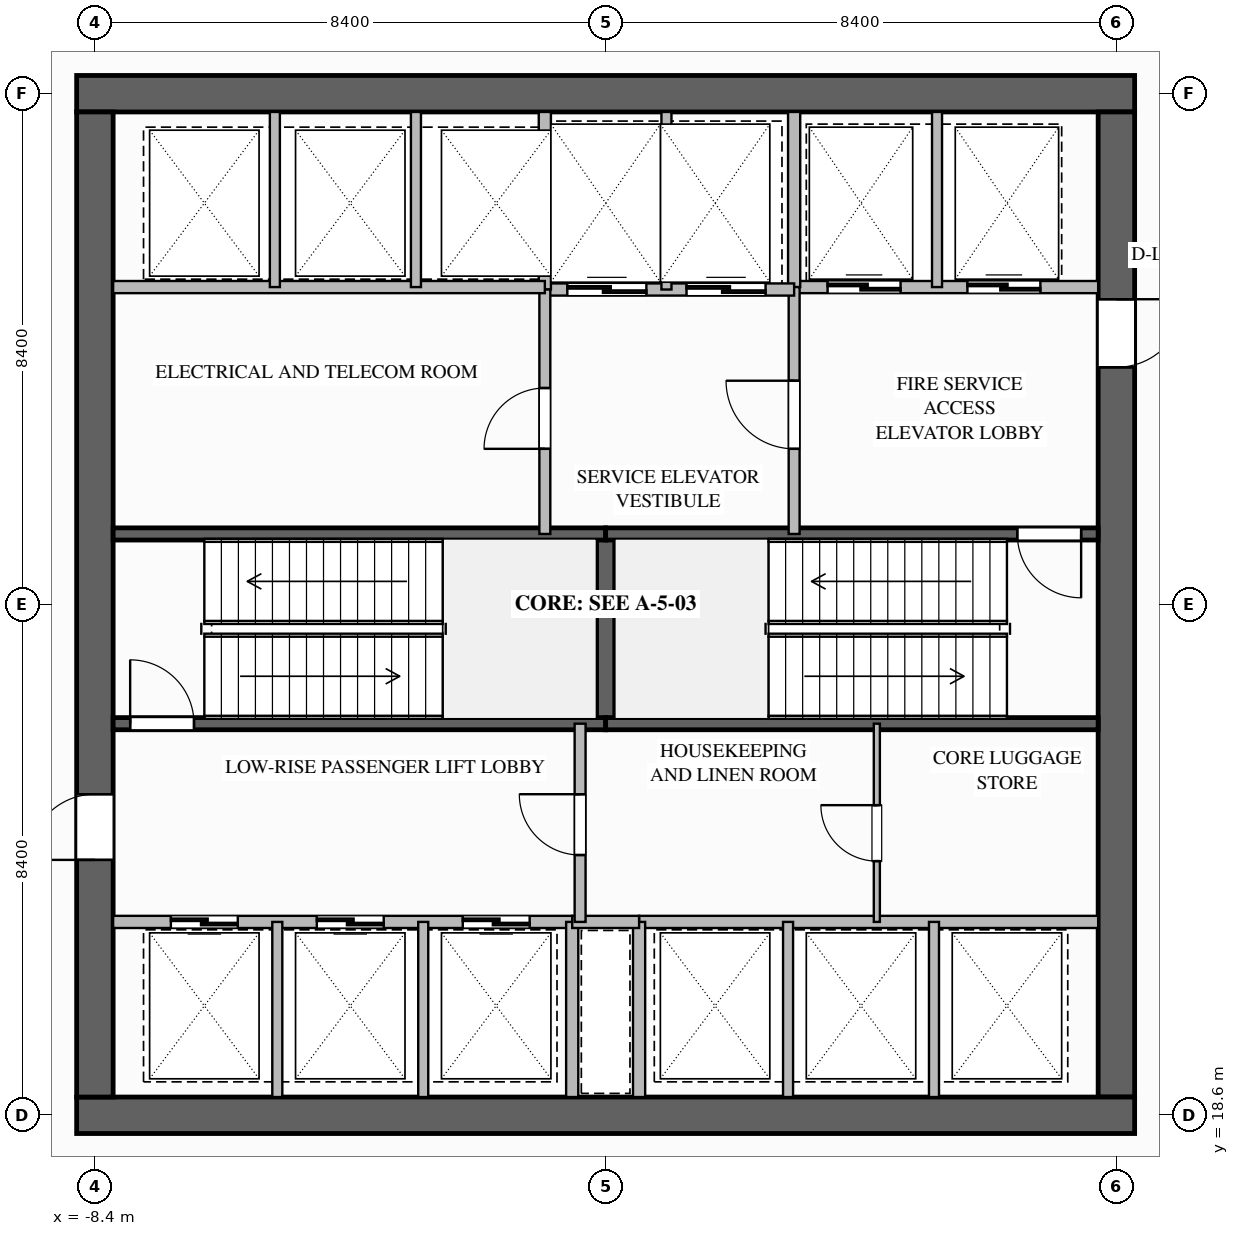
"""IFC4 building model, lengths in metres.
Left out: names, types, materials, properties, quantities, classifications, styles, units other than length and angle.
Written with IfcOpenShell. Run it as: python <this file> out.ifc"""

import sys

from ifc_helpers import new_model, si_unit, direction, frame, frame_2d, origin, place, context, subcontext, project, spatial, rectangle, extrude, element, fill, save


model = new_model("IFC4")
c1 = context("Model", 3, precision=1e-05, world=origin(), true_north=direction((0.0, 1.0)))
c2 = subcontext(c1, "Body", "Model", "MODEL_VIEW")
j1 = project(units=[si_unit("LENGTHUNIT", "METRE"), si_unit("PLANEANGLEUNIT", "RADIAN")], contexts=[c1])
p1 = place(None, origin())
s1 = spatial("IfcSite", under=j1, at=p1, CompositionType="ELEMENT")
p2 = place(p1, origin())
s2 = spatial("IfcBuilding", under=s1, at=p2, CompositionType="ELEMENT")
p3 = place(p2, frame((0.0, 0.0, 22.4)))
s3 = spatial("IfcBuildingStorey", under=s2, at=p3, CompositionType="ELEMENT", Elevation=22.4)
p4 = place(p3, frame((-8.7, 35.4, 0.0), z_axis=(0.0, 0.0, 1.0), x_axis=(1.0, 0.0, 0.0)))
e1 = element("IfcWall", 1, at=p4, inside=s3, PredefinedType="SHEAR", context=c2, shape_type="SweptSolid", body=[
    extrude(rectangle(XDim=17.4, YDim=0.6, at=frame_2d((8.7, 0.0))), origin(), (0.0, 0.0, 1.0), 5.2),
])
p5 = place(p3, frame((8.4, 35.1, 0.0), z_axis=(0.0, 0.0, 1.0), x_axis=(0.0, -1.0, 0.0)))
e2 = element("IfcWall", 2, at=p5, inside=s3, PredefinedType="SHEAR", context=c2, shape_type="SweptSolid", body=[
    extrude(rectangle(XDim=16.2, YDim=0.6, at=frame_2d((8.1, 0.0))), origin(), (0.0, 0.0, 1.0), 5.2),
])
p6 = place(p5, frame((3.08, 0.0, 0.0)))
e3 = element("IfcOpeningElement", 3, at=p6, cuts=e2, PredefinedType="OPENING", context=c2, shape_type="SweptSolid", body=[
    extrude(rectangle(XDim=1.12, YDim=2.1, at=frame_2d((0.56, 1.05))), frame((0.0, 0.31, 0.0), z_axis=(0.0, -1.0, 0.0), x_axis=(1.0, 0.0, 0.0)), (0.0, 0.0, 1.0), 0.62),
])
p7 = place(p3, frame((8.7, 18.6, 0.0), z_axis=(0.0, 0.0, 1.0), x_axis=(-1.0, 0.0, 0.0)))
e4 = element("IfcWall", 4, at=p7, inside=s3, PredefinedType="SHEAR", context=c2, shape_type="SweptSolid", body=[
    extrude(rectangle(XDim=17.4, YDim=0.6, at=frame_2d((8.7, 0.0))), origin(), (0.0, 0.0, 1.0), 5.2),
])
p8 = place(p3, frame((-8.4, 18.9, 0.0), z_axis=(0.0, 0.0, 1.0), x_axis=(0.0, 1.0, 0.0)))
e5 = element("IfcWall", 5, at=p8, inside=s3, PredefinedType="SHEAR", context=c2, shape_type="SweptSolid", body=[
    extrude(rectangle(XDim=16.2, YDim=0.6, at=frame_2d((8.1, 0.0))), origin(), (0.0, 0.0, 1.0), 5.2),
])
p9 = place(p8, frame((3.9, 0.0, 0.0)))
e6 = element("IfcOpeningElement", 6, at=p9, cuts=e5, PredefinedType="OPENING", context=c2, shape_type="SweptSolid", body=[
    extrude(rectangle(XDim=1.08, YDim=2.04, at=frame_2d((0.54, 1.02))), frame((0.0, 0.31, 0.0), z_axis=(0.0, -1.0, 0.0), x_axis=(1.0, 0.0, 0.0)), (0.0, 0.0, 1.0), 0.62),
])
p10 = place(p3, frame((0.0, 25.04, 0.0), z_axis=(0.0, 0.0, 1.0), x_axis=(0.0, 1.0, 0.0)))
e7 = element("IfcWall", 7, at=p10, inside=s3, PredefinedType="SOLIDWALL", context=c2, shape_type="SweptSolid", body=[
    extrude(rectangle(XDim=3.12, YDim=0.3, at=frame_2d((1.56, 0.0))), origin(), (0.0, 0.0, 1.0), 4.85),
])
p11 = place(p3, frame((-8.1, 25.04, 0.0), z_axis=(0.0, 0.0, 1.0), x_axis=(1.0, 0.0, 0.0)))
e8 = element("IfcWall", 8, at=p11, inside=s3, PredefinedType="SOLIDWALL", context=c2, shape_type="SweptSolid", body=[
    extrude(rectangle(XDim=8.1, YDim=0.2, at=frame_2d((4.05, 0.0))), origin(), (0.0, 0.0, 1.0), 4.85),
])
p12 = place(p11, frame((0.28, 0.0, 0.0)))
e9 = element("IfcOpeningElement", 9, at=p12, cuts=e8, PredefinedType="OPENING", context=c2, shape_type="SweptSolid", body=[
    extrude(rectangle(XDim=1.05, YDim=2.1, at=frame_2d((0.525, 1.05))), frame((0.0, 0.11, 0.0), z_axis=(0.0, -1.0, 0.0), x_axis=(1.0, 0.0, 0.0)), (0.0, 0.0, 1.0), 0.22),
])
for number, where, z_axis, x_axis in (
    (10, (-8.1, 28.16, 0.0), (0.0, 0.0, 1.0), (1.0, 0.0, 0.0)),
    (11, (0.0, 25.04, 0.0), (0.0, 0.0, 1.0), (1.0, 0.0, 0.0)),
):
    element("IfcWall", number, at=place(p3, frame(where, z_axis=z_axis, x_axis=x_axis)), inside=s3, PredefinedType="SOLIDWALL", context=c2, shape_type="SweptSolid", body=[
        extrude(rectangle(XDim=8.1, YDim=0.2, at=frame_2d((4.05, 0.0))), origin(), (0.0, 0.0, 1.0), 4.85),
    ])
p13 = place(p3, frame((8.1, 28.16, 0.0), z_axis=(0.0, 0.0, 1.0), x_axis=(-1.0, 0.0, 0.0)))
e12 = element("IfcWall", 12, at=p13, inside=s3, PredefinedType="SOLIDWALL", context=c2, shape_type="SweptSolid", body=[
    extrude(rectangle(XDim=8.1, YDim=0.2, at=frame_2d((4.05, 0.0))), origin(), (0.0, 0.0, 1.0), 4.85),
])
p14 = place(p13, frame((0.28, 0.0, 0.0)))
e13 = element("IfcOpeningElement", 13, at=p14, cuts=e12, PredefinedType="OPENING", context=c2, shape_type="SweptSolid", body=[
    extrude(rectangle(XDim=1.05, YDim=2.1, at=frame_2d((0.525, 1.05))), frame((0.0, 0.11, 0.0), z_axis=(0.0, -1.0, 0.0), x_axis=(1.0, 0.0, 0.0)), (0.0, 0.0, 1.0), 0.22),
])
p15 = place(p3, frame((3.1, 32.22, 0.0), z_axis=(0.0, 0.0, 1.0), x_axis=(1.0, 0.0, 0.0)))
e14 = element("IfcWall", 14, at=p15, inside=s3, PredefinedType="SOLIDWALL", context=c2, shape_type="SweptSolid", body=[
    extrude(rectangle(XDim=5.0, YDim=0.2, at=frame_2d((2.5, 0.0))), origin(), (0.0, 0.0, 1.0), 4.85),
])
p16 = place(p15, frame((0.55, 0.0, 0.0)))
e15 = element("IfcOpeningElement", 15, at=p16, cuts=e14, PredefinedType="OPENING", context=c2, shape_type="SweptSolid", body=[
    extrude(rectangle(XDim=1.2, YDim=2.2, at=frame_2d((0.6, 1.1))), frame((0.0, 0.11, 0.0), z_axis=(0.0, -1.0, 0.0), x_axis=(1.0, 0.0, 0.0)), (0.0, 0.0, 1.0), 0.22),
])
p17 = place(p15, frame((2.85, 0.0, 0.0)))
e16 = element("IfcOpeningElement", 16, at=p17, cuts=e14, PredefinedType="OPENING", context=c2, shape_type="SweptSolid", body=[
    extrude(rectangle(XDim=1.2, YDim=2.2, at=frame_2d((0.6, 1.1))), frame((0.0, 0.11, 0.0), z_axis=(0.0, -1.0, 0.0), x_axis=(1.0, 0.0, 0.0)), (0.0, 0.0, 1.0), 0.22),
])
p18 = place(p3, frame((3.1, 32.22, 0.0), z_axis=(0.0, 0.0, 1.0), x_axis=(0.0, 1.0, 0.0)))
e17 = element("IfcWall", 17, at=p18, inside=s3, PredefinedType="SOLIDWALL", context=c2, shape_type="SweptSolid", body=[
    extrude(rectangle(XDim=2.88, YDim=0.2, at=frame_2d((1.44, 0.0))), origin(), (0.0, 0.0, 1.0), 4.85),
])
p19 = place(p3, frame((5.45, 32.22, 0.0), z_axis=(0.0, 0.0, 1.0), x_axis=(0.0, 1.0, 0.0)))
e18 = element("IfcWall", 18, at=p19, inside=s3, PredefinedType="PARTITIONING", context=c2, shape_type="SweptSolid", body=[
    extrude(rectangle(XDim=2.88, YDim=0.165, at=frame_2d((1.44, 0.0))), origin(), (0.0, 0.0, 1.0), 4.85),
])
p20 = place(p3, frame((3.1, 28.16, 0.0), z_axis=(0.0, 0.0, 1.0), x_axis=(0.0, 1.0, 0.0)))
e19 = element("IfcWall", 19, at=p20, inside=s3, PredefinedType="SOLIDWALL", context=c2, shape_type="SweptSolid", body=[
    extrude(rectangle(XDim=4.06, YDim=0.18, at=frame_2d((2.03, 0.0))), origin(), (0.0, 0.0, 1.0), 4.85),
])
p21 = place(p20, frame((1.4, 0.0, 0.0)))
e20 = element("IfcOpeningElement", 20, at=p21, cuts=e19, PredefinedType="OPENING", context=c2, shape_type="SweptSolid", body=[
    extrude(rectangle(XDim=1.12, YDim=2.1, at=frame_2d((0.56, 1.05))), frame((0.0, 0.1, 0.0), z_axis=(0.0, -1.0, 0.0), x_axis=(1.0, 0.0, 0.0)), (0.0, 0.0, 1.0), 0.2),
])
p22 = place(p3, frame((-1.0, 32.18, 0.0), z_axis=(0.0, 0.0, 1.0), x_axis=(1.0, 0.0, 0.0)))
e21 = element("IfcWall", 21, at=p22, inside=s3, PredefinedType="SOLIDWALL", context=c2, shape_type="SweptSolid", body=[
    extrude(rectangle(XDim=4.1, YDim=0.2, at=frame_2d((2.05, 0.0))), origin(), (0.0, 0.0, 1.0), 4.85),
])
p23 = place(p22, frame((0.37, 0.0, 0.0)))
e22 = element("IfcOpeningElement", 22, at=p23, cuts=e21, PredefinedType="OPENING", context=c2, shape_type="SweptSolid", body=[
    extrude(rectangle(XDim=1.3, YDim=2.2, at=frame_2d((0.65, 1.1))), frame((0.0, 0.11, 0.0), z_axis=(0.0, -1.0, 0.0), x_axis=(1.0, 0.0, 0.0)), (0.0, 0.0, 1.0), 0.22),
])
p24 = place(p22, frame((2.33, 0.0, 0.0)))
e23 = element("IfcOpeningElement", 23, at=p24, cuts=e21, PredefinedType="OPENING", context=c2, shape_type="SweptSolid", body=[
    extrude(rectangle(XDim=1.3, YDim=2.2, at=frame_2d((0.65, 1.1))), frame((0.0, 0.11, 0.0), z_axis=(0.0, -1.0, 0.0), x_axis=(1.0, 0.0, 0.0)), (0.0, 0.0, 1.0), 0.22),
])
p25 = place(p3, frame((-1.0, 32.18, 0.0), z_axis=(0.0, 0.0, 1.0), x_axis=(0.0, 1.0, 0.0)))
e24 = element("IfcWall", 24, at=p25, inside=s3, PredefinedType="SOLIDWALL", context=c2, shape_type="SweptSolid", body=[
    extrude(rectangle(XDim=2.92, YDim=0.2, at=frame_2d((1.46, 0.0))), origin(), (0.0, 0.0, 1.0), 4.85),
])
p26 = place(p3, frame((1.0, 32.18, 0.0), z_axis=(0.0, 0.0, 1.0), x_axis=(0.0, 1.0, 0.0)))
e25 = element("IfcWall", 25, at=p26, inside=s3, PredefinedType="PARTITIONING", context=c2, shape_type="SweptSolid", body=[
    extrude(rectangle(XDim=2.92, YDim=0.165, at=frame_2d((1.46, 0.0))), origin(), (0.0, 0.0, 1.0), 4.85),
])
p27 = place(p3, frame((-1.0, 28.16, 0.0), z_axis=(0.0, 0.0, 1.0), x_axis=(0.0, 1.0, 0.0)))
e26 = element("IfcWall", 26, at=p27, inside=s3, PredefinedType="SOLIDWALL", context=c2, shape_type="SweptSolid", body=[
    extrude(rectangle(XDim=4.02, YDim=0.18, at=frame_2d((2.01, 0.0))), origin(), (0.0, 0.0, 1.0), 4.85),
])
p28 = place(p27, frame((1.4, 0.0, 0.0)))
e27 = element("IfcOpeningElement", 27, at=p28, cuts=e26, PredefinedType="OPENING", context=c2, shape_type="SweptSolid", body=[
    extrude(rectangle(XDim=1.0, YDim=2.1, at=frame_2d((0.5, 1.05))), frame((0.0, 0.1, 0.0), z_axis=(0.0, -1.0, 0.0), x_axis=(1.0, 0.0, 0.0)), (0.0, 0.0, 1.0), 0.2),
])
p29 = place(p3, frame((-8.1, 32.22, 0.0), z_axis=(0.0, 0.0, 1.0), x_axis=(1.0, 0.0, 0.0)))
e28 = element("IfcWall", 28, at=p29, inside=s3, PredefinedType="SOLIDWALL", context=c2, shape_type="SweptSolid", body=[
    extrude(rectangle(XDim=7.1, YDim=0.2, at=frame_2d((3.55, 0.0))), origin(), (0.0, 0.0, 1.0), 4.85),
])
for number, where, z_axis, x_axis in (
    (29, (-5.44, 32.22, 0.0), (0.0, 0.0, 1.0), (0.0, 1.0, 0.0)),
    (30, (-3.12, 32.22, 0.0), (0.0, 0.0, 1.0), (0.0, 1.0, 0.0)),
):
    element("IfcWall", number, at=place(p3, frame(where, z_axis=z_axis, x_axis=x_axis)), inside=s3, PredefinedType="PARTITIONING", context=c2, shape_type="SweptSolid", body=[
        extrude(rectangle(XDim=2.88, YDim=0.165, at=frame_2d((1.44, 0.0))), origin(), (0.0, 0.0, 1.0), 4.85),
    ])
p30 = place(p3, frame((-0.55, 21.78, 0.0), z_axis=(0.0, 0.0, 1.0), x_axis=(-1.0, 0.0, 0.0)))
e31 = element("IfcWall", 31, at=p30, inside=s3, PredefinedType="SOLIDWALL", context=c2, shape_type="SweptSolid", body=[
    extrude(rectangle(XDim=7.55, YDim=0.2, at=frame_2d((3.775, 0.0))), origin(), (0.0, 0.0, 1.0), 4.85),
])
p31 = place(p30, frame((5.5, 0.0, 0.0)))
e32 = element("IfcOpeningElement", 32, at=p31, cuts=e31, PredefinedType="OPENING", context=c2, shape_type="SweptSolid", body=[
    extrude(rectangle(XDim=1.1, YDim=2.2, at=frame_2d((0.55, 1.1))), frame((0.0, 0.11, 0.0), z_axis=(0.0, -1.0, 0.0), x_axis=(1.0, 0.0, 0.0)), (0.0, 0.0, 1.0), 0.22),
])
p32 = place(p30, frame((3.1, 0.0, 0.0)))
e33 = element("IfcOpeningElement", 33, at=p32, cuts=e31, PredefinedType="OPENING", context=c2, shape_type="SweptSolid", body=[
    extrude(rectangle(XDim=1.1, YDim=2.2, at=frame_2d((0.55, 1.1))), frame((0.0, 0.11, 0.0), z_axis=(0.0, -1.0, 0.0), x_axis=(1.0, 0.0, 0.0)), (0.0, 0.0, 1.0), 0.22),
])
p33 = place(p30, frame((0.7, 0.0, 0.0)))
e34 = element("IfcOpeningElement", 34, at=p33, cuts=e31, PredefinedType="OPENING", context=c2, shape_type="SweptSolid", body=[
    extrude(rectangle(XDim=1.1, YDim=2.2, at=frame_2d((0.55, 1.1))), frame((0.0, 0.11, 0.0), z_axis=(0.0, -1.0, 0.0), x_axis=(1.0, 0.0, 0.0)), (0.0, 0.0, 1.0), 0.22),
])
for number, where, z_axis, x_axis in (
    (35, (-5.4, 18.9, 0.0), (0.0, 0.0, 1.0), (0.0, 1.0, 0.0)),
    (36, (-3.0, 18.9, 0.0), (0.0, 0.0, 1.0), (0.0, 1.0, 0.0)),
):
    element("IfcWall", number, at=place(p3, frame(where, z_axis=z_axis, x_axis=x_axis)), inside=s3, PredefinedType="PARTITIONING", context=c2, shape_type="SweptSolid", body=[
        extrude(rectangle(XDim=2.88, YDim=0.165, at=frame_2d((1.44, 0.0))), origin(), (0.0, 0.0, 1.0), 4.85),
    ])
p34 = place(p3, frame((-0.55, 18.9, 0.0), z_axis=(0.0, 0.0, 1.0), x_axis=(0.0, 1.0, 0.0)))
e37 = element("IfcWall", 37, at=p34, inside=s3, PredefinedType="SOLIDWALL", context=c2, shape_type="SweptSolid", body=[
    extrude(rectangle(XDim=2.88, YDim=0.2, at=frame_2d((1.44, 0.0))), origin(), (0.0, 0.0, 1.0), 4.85),
])
p35 = place(p3, frame((8.1, 21.78, 0.0), z_axis=(0.0, 0.0, 1.0), x_axis=(-1.0, 0.0, 0.0)))
e38 = element("IfcWall", 38, at=p35, inside=s3, PredefinedType="SOLIDWALL", context=c2, shape_type="SweptSolid", body=[
    extrude(rectangle(XDim=7.55, YDim=0.2, at=frame_2d((3.775, 0.0))), origin(), (0.0, 0.0, 1.0), 4.85),
])
p36 = place(p3, frame((0.55, 18.9, 0.0), z_axis=(0.0, 0.0, 1.0), x_axis=(0.0, 1.0, 0.0)))
e39 = element("IfcWall", 39, at=p36, inside=s3, PredefinedType="SOLIDWALL", context=c2, shape_type="SweptSolid", body=[
    extrude(rectangle(XDim=2.88, YDim=0.2, at=frame_2d((1.44, 0.0))), origin(), (0.0, 0.0, 1.0), 4.85),
])
for number, where, z_axis, x_axis in (
    (40, (3.0, 18.9, 0.0), (0.0, 0.0, 1.0), (0.0, 1.0, 0.0)),
    (41, (5.4, 18.9, 0.0), (0.0, 0.0, 1.0), (0.0, 1.0, 0.0)),
):
    element("IfcWall", number, at=place(p3, frame(where, z_axis=z_axis, x_axis=x_axis)), inside=s3, PredefinedType="PARTITIONING", context=c2, shape_type="SweptSolid", body=[
        extrude(rectangle(XDim=2.88, YDim=0.165, at=frame_2d((1.44, 0.0))), origin(), (0.0, 0.0, 1.0), 4.85),
    ])
p37 = place(p3, frame((-0.55, 21.78, 0.0), z_axis=(0.0, 0.0, 1.0), x_axis=(1.0, 0.0, 0.0)))
e42 = element("IfcWall", 42, at=p37, inside=s3, PredefinedType="SOLIDWALL", context=c2, shape_type="SweptSolid", body=[
    extrude(rectangle(XDim=1.1, YDim=0.2, at=frame_2d((0.55, 0.0))), origin(), (0.0, 0.0, 1.0), 4.85),
])
p38 = place(p3, frame((-0.42, 21.78, 0.0), z_axis=(0.0, 0.0, 1.0), x_axis=(0.0, 1.0, 0.0)))
e43 = element("IfcWall", 43, at=p38, inside=s3, PredefinedType="SOLIDWALL", context=c2, shape_type="SweptSolid", body=[
    extrude(rectangle(XDim=3.26, YDim=0.18, at=frame_2d((1.63, 0.0))), origin(), (0.0, 0.0, 1.0), 4.85),
])
p39 = place(p38, frame((1.1, 0.0, 0.0)))
e44 = element("IfcOpeningElement", 44, at=p39, cuts=e43, PredefinedType="OPENING", context=c2, shape_type="SweptSolid", body=[
    extrude(rectangle(XDim=1.0, YDim=2.1, at=frame_2d((0.5, 1.05))), frame((0.0, 0.1, 0.0), z_axis=(0.0, -1.0, 0.0), x_axis=(1.0, 0.0, 0.0)), (0.0, 0.0, 1.0), 0.2),
])
p40 = place(p3, frame((4.46, 21.78, 0.0), z_axis=(0.0, 0.0, 1.0), x_axis=(0.0, 1.0, 0.0)))
e45 = element("IfcWall", 45, at=p40, inside=s3, PredefinedType="PARTITIONING", context=c2, shape_type="SweptSolid", body=[
    extrude(rectangle(XDim=3.26, YDim=0.1, at=frame_2d((1.63, 0.0))), origin(), (0.0, 0.0, 1.0), 4.85),
])
p41 = place(p40, frame((1.0, 0.0, 0.0)))
e46 = element("IfcOpeningElement", 46, at=p41, cuts=e45, PredefinedType="OPENING", context=c2, shape_type="SweptSolid", body=[
    extrude(rectangle(XDim=0.92, YDim=2.1, at=frame_2d((0.46, 1.05))), frame((0.0, 0.06, 0.0), z_axis=(0.0, -1.0, 0.0), x_axis=(1.0, 0.0, 0.0)), (0.0, 0.0, 1.0), 0.12),
])
p42 = place(p12, origin())
e47 = element("IfcDoor", 47, at=p42, inside=s3, OperationType="SINGLE_SWING_LEFT", PredefinedType="DOOR", context=c2, shape_type="SweptSolid", body=[
    extrude(rectangle(XDim=1.05, YDim=2.1, at=frame_2d((0.525, 1.05))), frame((0.0, 0.025, 0.0), z_axis=(0.0, -1.0, 0.0), x_axis=(1.0, 0.0, 0.0)), (0.0, 0.0, 1.0), 0.05),
])
fill(e9, e47)
p43 = place(p14, origin())
e48 = element("IfcDoor", 48, at=p43, inside=s3, OperationType="SINGLE_SWING_LEFT", PredefinedType="DOOR", context=c2, shape_type="SweptSolid", body=[
    extrude(rectangle(XDim=1.05, YDim=2.1, at=frame_2d((0.525, 1.05))), frame((0.0, 0.025, 0.0), z_axis=(0.0, -1.0, 0.0), x_axis=(1.0, 0.0, 0.0)), (0.0, 0.0, 1.0), 0.05),
])
fill(e13, e48)
p44 = place(p16, origin())
e49 = element("IfcDoor", 49, at=p44, inside=s3, OperationType="SLIDING_TO_LEFT", PredefinedType="DOOR", context=c2, shape_type="SweptSolid", body=[
    extrude(rectangle(XDim=1.2, YDim=2.2, at=frame_2d((0.6, 1.1))), frame((0.0, 0.025, 0.0), z_axis=(0.0, -1.0, 0.0), x_axis=(1.0, 0.0, 0.0)), (0.0, 0.0, 1.0), 0.05),
])
fill(e15, e49)
p45 = place(p17, origin())
e50 = element("IfcDoor", 50, at=p45, inside=s3, OperationType="SLIDING_TO_LEFT", PredefinedType="DOOR", context=c2, shape_type="SweptSolid", body=[
    extrude(rectangle(XDim=1.2, YDim=2.2, at=frame_2d((0.6, 1.1))), frame((0.0, 0.025, 0.0), z_axis=(0.0, -1.0, 0.0), x_axis=(1.0, 0.0, 0.0)), (0.0, 0.0, 1.0), 0.05),
])
fill(e16, e50)
p46 = place(p21, origin())
e51 = element("IfcDoor", 51, at=p46, inside=s3, OperationType="SINGLE_SWING_RIGHT", PredefinedType="DOOR", context=c2, shape_type="SweptSolid", body=[
    extrude(rectangle(XDim=1.12, YDim=2.1, at=frame_2d((0.56, 1.05))), frame((0.0, 0.025, 0.0), z_axis=(0.0, -1.0, 0.0), x_axis=(1.0, 0.0, 0.0)), (0.0, 0.0, 1.0), 0.05),
])
fill(e20, e51)
p47 = place(p6, origin())
e52 = element("IfcDoor", 52, at=p47, inside=s3, OperationType="SINGLE_SWING_LEFT", PredefinedType="DOOR", context=c2, shape_type="SweptSolid", body=[
    extrude(rectangle(XDim=1.12, YDim=2.1, at=frame_2d((0.56, 1.05))), frame((0.0, 0.025, 0.0), z_axis=(0.0, -1.0, 0.0), x_axis=(1.0, 0.0, 0.0)), (0.0, 0.0, 1.0), 0.05),
])
fill(e3, e52)
p48 = place(p23, origin())
e53 = element("IfcDoor", 53, at=p48, inside=s3, OperationType="SLIDING_TO_LEFT", PredefinedType="DOOR", context=c2, shape_type="SweptSolid", body=[
    extrude(rectangle(XDim=1.3, YDim=2.2, at=frame_2d((0.65, 1.1))), frame((0.0, 0.025, 0.0), z_axis=(0.0, -1.0, 0.0), x_axis=(1.0, 0.0, 0.0)), (0.0, 0.0, 1.0), 0.05),
])
fill(e22, e53)
p49 = place(p24, origin())
e54 = element("IfcDoor", 54, at=p49, inside=s3, OperationType="SLIDING_TO_LEFT", PredefinedType="DOOR", context=c2, shape_type="SweptSolid", body=[
    extrude(rectangle(XDim=1.3, YDim=2.2, at=frame_2d((0.65, 1.1))), frame((0.0, 0.025, 0.0), z_axis=(0.0, -1.0, 0.0), x_axis=(1.0, 0.0, 0.0)), (0.0, 0.0, 1.0), 0.05),
])
fill(e23, e54)
p50 = place(p28, origin())
e55 = element("IfcDoor", 55, at=p50, inside=s3, OperationType="SINGLE_SWING_LEFT", PredefinedType="DOOR", context=c2, shape_type="SweptSolid", body=[
    extrude(rectangle(XDim=1.0, YDim=2.1, at=frame_2d((0.5, 1.05))), frame((0.0, 0.025, 0.0), z_axis=(0.0, -1.0, 0.0), x_axis=(1.0, 0.0, 0.0)), (0.0, 0.0, 1.0), 0.05),
])
fill(e27, e55)
p51 = place(p31, origin())
e56 = element("IfcDoor", 56, at=p51, inside=s3, OperationType="SLIDING_TO_LEFT", PredefinedType="DOOR", context=c2, shape_type="SweptSolid", body=[
    extrude(rectangle(XDim=1.1, YDim=2.2, at=frame_2d((0.55, 1.1))), frame((0.0, 0.025, 0.0), z_axis=(0.0, -1.0, 0.0), x_axis=(1.0, 0.0, 0.0)), (0.0, 0.0, 1.0), 0.05),
])
fill(e32, e56)
p52 = place(p32, origin())
e57 = element("IfcDoor", 57, at=p52, inside=s3, OperationType="SLIDING_TO_LEFT", PredefinedType="DOOR", context=c2, shape_type="SweptSolid", body=[
    extrude(rectangle(XDim=1.1, YDim=2.2, at=frame_2d((0.55, 1.1))), frame((0.0, 0.025, 0.0), z_axis=(0.0, -1.0, 0.0), x_axis=(1.0, 0.0, 0.0)), (0.0, 0.0, 1.0), 0.05),
])
fill(e33, e57)
p53 = place(p33, origin())
e58 = element("IfcDoor", 58, at=p53, inside=s3, OperationType="SLIDING_TO_LEFT", PredefinedType="DOOR", context=c2, shape_type="SweptSolid", body=[
    extrude(rectangle(XDim=1.1, YDim=2.2, at=frame_2d((0.55, 1.1))), frame((0.0, 0.025, 0.0), z_axis=(0.0, -1.0, 0.0), x_axis=(1.0, 0.0, 0.0)), (0.0, 0.0, 1.0), 0.05),
])
fill(e34, e58)
p54 = place(p39, origin())
e59 = element("IfcDoor", 59, at=p54, inside=s3, OperationType="SINGLE_SWING_RIGHT", PredefinedType="DOOR", context=c2, shape_type="SweptSolid", body=[
    extrude(rectangle(XDim=1.0, YDim=2.1, at=frame_2d((0.5, 1.05))), frame((0.0, 0.025, 0.0), z_axis=(0.0, -1.0, 0.0), x_axis=(1.0, 0.0, 0.0)), (0.0, 0.0, 1.0), 0.05),
])
fill(e44, e59)
p55 = place(p9, origin())
e60 = element("IfcDoor", 60, at=p55, inside=s3, OperationType="SINGLE_SWING_LEFT", PredefinedType="DOOR", context=c2, shape_type="SweptSolid", body=[
    extrude(rectangle(XDim=1.08, YDim=2.04, at=frame_2d((0.54, 1.02))), frame((0.0, 0.025, 0.0), z_axis=(0.0, -1.0, 0.0), x_axis=(1.0, 0.0, 0.0)), (0.0, 0.0, 1.0), 0.05),
])
fill(e6, e60)
p56 = place(p41, origin())
e61 = element("IfcDoor", 61, at=p56, inside=s3, OperationType="SINGLE_SWING_RIGHT", PredefinedType="DOOR", context=c2, shape_type="SweptSolid", body=[
    extrude(rectangle(XDim=0.92, YDim=2.1, at=frame_2d((0.46, 1.05))), frame((0.0, 0.025, 0.0), z_axis=(0.0, -1.0, 0.0), x_axis=(1.0, 0.0, 0.0)), (0.0, 0.0, 1.0), 0.05),
])
fill(e46, e61)
save(model, sys.argv[1])
